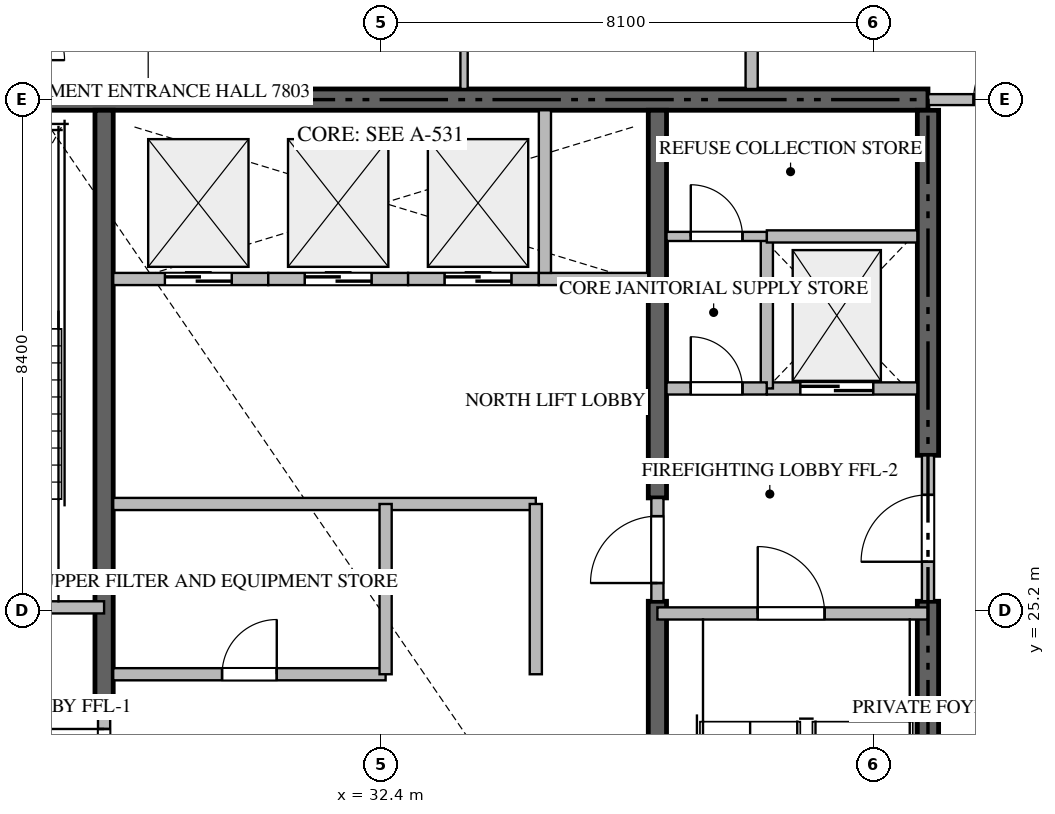
"""IFC4 building model, lengths in metres.
Left out: names, types, materials, properties, quantities, classifications, styles, units other than length and angle.
Written with IfcOpenShell. Run it as: python <this file> out.ifc"""

import sys

from ifc_helpers import new_model, si_unit, direction, frame, frame_2d, origin, place, context, subcontext, project, spatial, rectangle, extrude, source, transform, mapped, element, fill, save


model = new_model("IFC4")
c1 = context("Model", 3, precision=1e-05, world=origin(), true_north=direction((0.0, 1.0)))
c2 = subcontext(c1, "Body", "Model", "MODEL_VIEW")
j1 = project(units=[si_unit("LENGTHUNIT", "METRE"), si_unit("PLANEANGLEUNIT", "RADIAN")], contexts=[c1])
p1 = place(None, origin())
s1 = spatial("IfcSite", under=j1, at=p1, CompositionType="ELEMENT")
p2 = place(p1, origin())
s2 = spatial("IfcBuilding", under=s1, at=p2, CompositionType="ELEMENT")
p3 = place(p2, frame((0.0, 0.0, 313.7)))
s3 = spatial("IfcBuildingStorey", under=s2, at=p3, CompositionType="ELEMENT", Elevation=313.7)
p4 = place(p3, frame((41.4, 33.6, -0.26), z_axis=(0.0, 0.0, 1.0), x_axis=(-1.0, 0.0, 0.0)))
e1 = element("IfcWall", 1, at=p4, inside=s3, PredefinedType="SHEAR", context=c2, shape_type="SweptSolid", body=[
    extrude(rectangle(XDim=18.0, YDim=0.35, at=frame_2d((9.0, 0.0))), origin(), (0.0, 0.0, 1.0), 4.048),
])
p5 = place(p3, frame((41.4, 16.975, -0.26), z_axis=(0.0, 0.0, 1.0), x_axis=(0.0, 1.0, 0.0)))
e2 = element("IfcWall", 2, at=p5, inside=s3, PredefinedType="SHEAR", context=c2, shape_type="SweptSolid", body=[
    extrude(rectangle(XDim=8.375, YDim=0.35, at=frame_2d((4.188, 0.0))), origin(), (0.0, 0.0, 1.0), 4.048),
])
p6 = place(p3, frame((41.4, 27.75, -0.26), z_axis=(0.0, 0.0, 1.0), x_axis=(0.0, 1.0, 0.0)))
e3 = element("IfcWall", 3, at=p6, inside=s3, PredefinedType="SHEAR", context=c2, shape_type="SweptSolid", body=[
    extrude(rectangle(XDim=5.675, YDim=0.35, at=frame_2d((2.837, 0.0))), origin(), (0.0, 0.0, 1.0), 4.048),
])
p7 = place(p3, frame((27.85, 23.55, -0.26), z_axis=(0.0, 0.0, 1.0), x_axis=(0.0, 1.0, 0.0)))
e4 = element("IfcWall", 4, at=p7, inside=s3, PredefinedType="SHEAR", context=c2, shape_type="SweptSolid", body=[
    extrude(rectangle(XDim=9.875, YDim=0.3, at=frame_2d((4.938, 0.0))), origin(), (0.0, 0.0, 1.0), 4.048),
])
p8 = place(p3, frame((36.95, 16.975, -0.26), z_axis=(0.0, 0.0, 1.0), x_axis=(0.0, 1.0, 0.0)))
e5 = element("IfcWall", 5, at=p8, inside=s3, PredefinedType="SHEAR", context=c2, shape_type="SweptSolid", body=[
    extrude(rectangle(XDim=8.375, YDim=0.3, at=frame_2d((4.188, 0.0))), origin(), (0.0, 0.0, 1.0), 4.048),
])
p9 = place(p3, frame((36.95, 27.05, -0.26), z_axis=(0.0, 0.0, 1.0), x_axis=(0.0, 1.0, 0.0)))
e6 = element("IfcWall", 6, at=p9, inside=s3, PredefinedType="SHEAR", context=c2, shape_type="SweptSolid", body=[
    extrude(rectangle(XDim=6.375, YDim=0.3, at=frame_2d((3.188, 0.0))), origin(), (0.0, 0.0, 1.0), 4.048),
])
p10 = place(p3, frame((23.4, 25.25, 0.0), z_axis=(0.0, 0.0, 1.0), x_axis=(1.0, 0.0, 0.0)))
e7 = element("IfcWall", 7, at=p10, inside=s3, PredefinedType="STANDARD", context=c2, shape_type="SweptSolid", body=[
    extrude(rectangle(XDim=4.45, YDim=0.2, at=frame_2d((2.225, 0.0))), origin(), (0.0, 0.0, 1.0), 3.79),
])
p11 = place(p10, frame((1.65, 0.0, 0.0)))
e8 = element("IfcOpeningElement", 8, at=p11, cuts=e7, PredefinedType="OPENING", context=c2, shape_type="SweptSolid", body=[
    extrude(rectangle(XDim=1.1, YDim=2.15, at=frame_2d((0.55, 1.075))), frame((0.0, 0.11, 0.0), z_axis=(0.0, -1.0, 0.0), x_axis=(1.0, 0.0, 0.0)), (0.0, 0.0, 1.0), 0.22),
])
p12 = place(p3, frame((36.95, 25.15, 0.0), z_axis=(0.0, 0.0, 1.0), x_axis=(1.0, 0.0, 0.0)))
e9 = element("IfcWall", 9, at=p12, inside=s3, PredefinedType="STANDARD", context=c2, shape_type="SweptSolid", body=[
    extrude(rectangle(XDim=4.45, YDim=0.2, at=frame_2d((2.225, 0.0))), origin(), (0.0, 0.0, 1.0), 3.79),
])
p13 = place(p12, frame((1.65, 0.0, 0.0)))
e10 = element("IfcOpeningElement", 10, at=p13, cuts=e9, PredefinedType="OPENING", context=c2, shape_type="SweptSolid", body=[
    extrude(rectangle(XDim=1.1, YDim=2.15, at=frame_2d((0.55, 1.075))), frame((0.0, 0.11, 0.0), z_axis=(0.0, -1.0, 0.0), x_axis=(1.0, 0.0, 0.0)), (0.0, 0.0, 1.0), 0.22),
])
p14 = place(p3, frame((38.75, 28.85, 0.0), z_axis=(0.0, 0.0, 1.0), x_axis=(1.0, 0.0, 0.0)))
e11 = element("IfcWall", 11, at=p14, inside=s3, PredefinedType="STANDARD", context=c2, shape_type="SweptSolid", body=[
    extrude(rectangle(XDim=2.475, YDim=0.2, at=frame_2d((1.238, 0.0))), origin(), (0.0, 0.0, 1.0), 3.79),
])
p15 = place(p14, frame((0.55, 0.0, 0.0)))
e12 = element("IfcOpeningElement", 12, at=p15, cuts=e11, PredefinedType="OPENING", context=c2, shape_type="SweptSolid", body=[
    extrude(rectangle(XDim=1.2, YDim=2.2, at=frame_2d((0.6, 1.1))), frame((0.0, 0.11, 0.0), z_axis=(0.0, -1.0, 0.0), x_axis=(1.0, 0.0, 0.0)), (0.0, 0.0, 1.0), 0.22),
])
p16 = place(p3, frame((28.0, 30.65, 0.0), z_axis=(0.0, 0.0, 1.0), x_axis=(1.0, 0.0, 0.0)))
e13 = element("IfcWall", 13, at=p16, inside=s3, PredefinedType="STANDARD", context=c2, shape_type="SweptSolid", body=[
    extrude(rectangle(XDim=2.55, YDim=0.2, at=frame_2d((1.275, 0.0))), origin(), (0.0, 0.0, 1.0), 3.79),
])
p17 = place(p16, frame((0.85, 0.0, 0.0)))
e14 = element("IfcOpeningElement", 14, at=p17, cuts=e13, PredefinedType="OPENING", context=c2, shape_type="SweptSolid", body=[
    extrude(rectangle(XDim=1.1, YDim=2.2, at=frame_2d((0.55, 1.1))), frame((0.0, 0.11, 0.0), z_axis=(0.0, -1.0, 0.0), x_axis=(1.0, 0.0, 0.0)), (0.0, 0.0, 1.0), 0.22),
])
p18 = place(p3, frame((30.55, 30.65, 0.0), z_axis=(0.0, 0.0, 1.0), x_axis=(1.0, 0.0, 0.0)))
e15 = element("IfcWall", 15, at=p18, inside=s3, PredefinedType="STANDARD", context=c2, shape_type="SweptSolid", body=[
    extrude(rectangle(XDim=2.3, YDim=0.2, at=frame_2d((1.15, 0.0))), origin(), (0.0, 0.0, 1.0), 3.79),
])
p19 = place(p18, frame((0.6, 0.0, 0.0)))
e16 = element("IfcOpeningElement", 16, at=p19, cuts=e15, PredefinedType="OPENING", context=c2, shape_type="SweptSolid", body=[
    extrude(rectangle(XDim=1.1, YDim=2.2, at=frame_2d((0.55, 1.1))), frame((0.0, 0.11, 0.0), z_axis=(0.0, -1.0, 0.0), x_axis=(1.0, 0.0, 0.0)), (0.0, 0.0, 1.0), 0.22),
])
p20 = place(p3, frame((32.85, 30.65, 0.0), z_axis=(0.0, 0.0, 1.0), x_axis=(1.0, 0.0, 0.0)))
e17 = element("IfcWall", 17, at=p20, inside=s3, PredefinedType="STANDARD", context=c2, shape_type="SweptSolid", body=[
    extrude(rectangle(XDim=2.15, YDim=0.2, at=frame_2d((1.075, 0.0))), origin(), (0.0, 0.0, 1.0), 3.79),
])
p21 = place(p20, frame((0.6, 0.0, 0.0)))
e18 = element("IfcOpeningElement", 18, at=p21, cuts=e17, PredefinedType="OPENING", context=c2, shape_type="SweptSolid", body=[
    extrude(rectangle(XDim=1.1, YDim=2.2, at=frame_2d((0.55, 1.1))), frame((0.0, 0.11, 0.0), z_axis=(0.0, -1.0, 0.0), x_axis=(1.0, 0.0, 0.0)), (0.0, 0.0, 1.0), 0.22),
])
p22 = place(p3, frame((35.0, 30.65, 0.0), z_axis=(0.0, 0.0, 1.0), x_axis=(1.0, 0.0, 0.0)))
e19 = element("IfcWall", 19, at=p22, inside=s3, PredefinedType="STANDARD", context=c2, shape_type="SweptSolid", body=[
    extrude(rectangle(XDim=1.8, YDim=0.2, at=frame_2d((0.9, 0.0))), origin(), (0.0, 0.0, 1.0), 3.79),
])
p23 = place(p3, frame((35.1, 30.75, 0.0), z_axis=(0.0, 0.0, 1.0), x_axis=(0.0, 1.0, 0.0)))
e20 = element("IfcWall", 20, at=p23, inside=s3, PredefinedType="STANDARD", context=c2, shape_type="SweptSolid", body=[
    extrude(rectangle(XDim=2.675, YDim=0.2, at=frame_2d((1.337, 0.0))), origin(), (0.0, 0.0, 1.0), 3.79),
])
p24 = place(p3, frame((38.75, 28.85, 0.0), z_axis=(0.0, 0.0, 1.0), x_axis=(0.0, 1.0, 0.0)))
e21 = element("IfcWall", 21, at=p24, inside=s3, PredefinedType="STANDARD", context=c2, shape_type="SweptSolid", body=[
    extrude(rectangle(XDim=2.5, YDim=0.2, at=frame_2d((1.25, 0.0))), origin(), (0.0, 0.0, 1.0), 3.79),
])
p25 = place(p3, frame((38.75, 31.35, 0.0), z_axis=(0.0, 0.0, 1.0), x_axis=(1.0, 0.0, 0.0)))
e22 = element("IfcWall", 22, at=p25, inside=s3, PredefinedType="STANDARD", context=c2, shape_type="SweptSolid", body=[
    extrude(rectangle(XDim=2.475, YDim=0.2, at=frame_2d((1.238, 0.0))), origin(), (0.0, 0.0, 1.0), 3.79),
])
p26 = place(p3, frame((37.1, 28.85, 0.0), z_axis=(0.0, 0.0, 1.0), x_axis=(1.0, 0.0, 0.0)))
e23 = element("IfcWall", 23, at=p26, inside=s3, PredefinedType="STANDARD", context=c2, shape_type="SweptSolid", body=[
    extrude(rectangle(XDim=1.648, YDim=0.2, at=frame_2d((0.824, 0.0))), origin(), (0.0, 0.0, 1.0), 3.79),
])
p27 = place(p26, frame((0.399, 0.0, 0.0)))
e24 = element("IfcOpeningElement", 24, at=p27, cuts=e23, PredefinedType="OPENING", context=c2, shape_type="SweptSolid", body=[
    extrude(rectangle(XDim=0.85, YDim=2.1, at=frame_2d((0.425, 1.05))), frame((0.0, 0.11, 0.0), z_axis=(0.0, -1.0, 0.0), x_axis=(1.0, 0.0, 0.0)), (0.0, 0.0, 1.0), 0.22),
])
p28 = place(p3, frame((41.4, 25.352, 0.0), z_axis=(0.0, 0.0, 1.0), x_axis=(0.0, 1.0, 0.0)))
e25 = element("IfcWall", 25, at=p28, inside=s3, PredefinedType="STANDARD", context=c2, shape_type="SweptSolid", body=[
    extrude(rectangle(XDim=2.396, YDim=0.2, at=frame_2d((1.198, 0.0))), origin(), (0.0, 0.0, 1.0), 3.79),
])
p29 = place(p28, frame((0.648, 0.0, 0.0)))
e26 = element("IfcOpeningElement", 26, at=p29, cuts=e25, PredefinedType="OPENING", context=c2, shape_type="SweptSolid", body=[
    extrude(rectangle(XDim=1.1, YDim=2.15, at=frame_2d((0.55, 1.075))), frame((0.0, 0.11, 0.0), z_axis=(0.0, -1.0, 0.0), x_axis=(1.0, 0.0, 0.0)), (0.0, 0.0, 1.0), 0.22),
])
p30 = place(p3, frame((27.85, 21.852, 0.0), z_axis=(0.0, 0.0, 1.0), x_axis=(0.0, 1.0, 0.0)))
e27 = element("IfcWall", 27, at=p30, inside=s3, PredefinedType="STANDARD", context=c2, shape_type="SweptSolid", body=[
    extrude(rectangle(XDim=1.696, YDim=0.2, at=frame_2d((0.848, 0.0))), origin(), (0.0, 0.0, 1.0), 3.79),
])
p31 = place(p30, frame((0.298, 0.0, 0.0)))
e28 = element("IfcOpeningElement", 28, at=p31, cuts=e27, PredefinedType="OPENING", context=c2, shape_type="SweptSolid", body=[
    extrude(rectangle(XDim=1.1, YDim=2.15, at=frame_2d((0.55, 1.075))), frame((0.0, 0.11, 0.0), z_axis=(0.0, -1.0, 0.0), x_axis=(1.0, 0.0, 0.0)), (0.0, 0.0, 1.0), 0.22),
])
p32 = place(p3, frame((36.95, 25.352, 0.0), z_axis=(0.0, 0.0, 1.0), x_axis=(0.0, 1.0, 0.0)))
e29 = element("IfcWall", 29, at=p32, inside=s3, PredefinedType="STANDARD", context=c2, shape_type="SweptSolid", body=[
    extrude(rectangle(XDim=1.696, YDim=0.2, at=frame_2d((0.848, 0.0))), origin(), (0.0, 0.0, 1.0), 3.79),
])
p33 = place(p32, frame((0.298, 0.0, 0.0)))
e30 = element("IfcOpeningElement", 30, at=p33, cuts=e29, PredefinedType="OPENING", context=c2, shape_type="SweptSolid", body=[
    extrude(rectangle(XDim=1.1, YDim=2.15, at=frame_2d((0.55, 1.075))), frame((0.0, 0.11, 0.0), z_axis=(0.0, -1.0, 0.0), x_axis=(1.0, 0.0, 0.0)), (0.0, 0.0, 1.0), 0.22),
])
p34 = place(p3, frame((37.1, 31.35, 0.0), z_axis=(0.0, 0.0, 1.0), x_axis=(1.0, 0.0, 0.0)))
e31 = element("IfcWall", 31, at=p34, inside=s3, PredefinedType="PARTITIONING", context=c2, shape_type="SweptSolid", body=[
    extrude(rectangle(XDim=1.648, YDim=0.15, at=frame_2d((0.824, 0.0))), origin(), (0.0, 0.0, 1.0), 3.79),
])
p35 = place(p34, frame((0.399, 0.0, 0.0)))
e32 = element("IfcOpeningElement", 32, at=p35, cuts=e31, PredefinedType="OPENING", context=c2, shape_type="SweptSolid", body=[
    extrude(rectangle(XDim=0.85, YDim=2.1, at=frame_2d((0.425, 1.05))), frame((0.0, 0.085, 0.0), z_axis=(0.0, -1.0, 0.0), x_axis=(1.0, 0.0, 0.0)), (0.0, 0.0, 1.0), 0.17),
])
p36 = place(p3, frame((28.0, 26.95, 0.0), z_axis=(0.0, 0.0, 1.0), x_axis=(1.0, 0.0, 0.0)))
e33 = element("IfcWall", 33, at=p36, inside=s3, PredefinedType="STANDARD", context=c2, shape_type="SweptSolid", body=[
    extrude(rectangle(XDim=6.95, YDim=0.2, at=frame_2d((3.475, 0.0))), origin(), (0.0, 0.0, 1.0), 3.79),
])
p37 = place(p3, frame((34.95, 24.15, 0.0), z_axis=(0.0, 0.0, 1.0), x_axis=(0.0, 1.0, 0.0)))
e34 = element("IfcWall", 34, at=p37, inside=s3, PredefinedType="STANDARD", context=c2, shape_type="SweptSolid", body=[
    extrude(rectangle(XDim=2.8, YDim=0.2, at=frame_2d((1.4, 0.0))), origin(), (0.0, 0.0, 1.0), 3.79),
])
p38 = place(p3, frame((28.0, 24.15, 0.0), z_axis=(0.0, 0.0, 1.0), x_axis=(1.0, 0.0, 0.0)))
e35 = element("IfcWall", 35, at=p38, inside=s3, PredefinedType="STANDARD", context=c2, shape_type="SweptSolid", body=[
    extrude(rectangle(XDim=4.48, YDim=0.2, at=frame_2d((2.24, 0.0))), origin(), (0.0, 0.0, 1.0), 3.79),
])
p39 = place(p38, frame((1.79, 0.0, 0.0)))
e36 = element("IfcOpeningElement", 36, at=p39, cuts=e35, PredefinedType="OPENING", context=c2, shape_type="SweptSolid", body=[
    extrude(rectangle(XDim=0.9, YDim=2.1, at=frame_2d((0.45, 1.05))), frame((0.0, 0.11, 0.0), z_axis=(0.0, -1.0, 0.0), x_axis=(1.0, 0.0, 0.0)), (0.0, 0.0, 1.0), 0.22),
])
p40 = place(p3, frame((32.48, 24.15, 0.0), z_axis=(0.0, 0.0, 1.0), x_axis=(0.0, 1.0, 0.0)))
e37 = element("IfcWall", 37, at=p40, inside=s3, PredefinedType="STANDARD", context=c2, shape_type="SweptSolid", body=[
    extrude(rectangle(XDim=2.8, YDim=0.2, at=frame_2d((1.4, 0.0))), origin(), (0.0, 0.0, 1.0), 3.79),
])
p41 = place(p3, frame((38.5, 33.775, 0.0), z_axis=(0.0, 0.0, 1.0), x_axis=(0.0, 1.0, 0.0)))
e38 = element("IfcWall", 38, at=p41, inside=s3, PredefinedType="PARTITIONING", context=c2, shape_type="SweptSolid", body=[
    extrude(rectangle(XDim=14.143, YDim=0.2, at=frame_2d((7.072, 0.0))), origin(), (0.0, 0.0, 1.0), 3.79),
])
p42 = place(p3, frame((41.402, 33.6, 0.0), z_axis=(0.0, 0.0, 1.0), x_axis=(1.0, 0.0, 0.0)))
e39 = element("IfcWall", 39, at=p42, inside=s3, PredefinedType="PARTITIONING", context=c2, shape_type="SweptSolid", body=[
    extrude(rectangle(XDim=2.496, YDim=0.18, at=frame_2d((1.248, 0.0))), origin(), (0.0, 0.0, 1.0), 3.79),
])
p43 = place(p42, frame((0.748, 0.0, 0.0)))
e40 = element("IfcOpeningElement", 40, at=p43, cuts=e39, PredefinedType="OPENING", context=c2, shape_type="SweptSolid", body=[
    extrude(rectangle(XDim=1.0, YDim=2.15, at=frame_2d((0.5, 1.075))), frame((0.0, 0.1, 0.0), z_axis=(0.0, -1.0, 0.0), x_axis=(1.0, 0.0, 0.0)), (0.0, 0.0, 1.0), 0.2),
])
p44 = place(p3, frame((33.77, 35.748, 0.0), z_axis=(0.0, 0.0, 1.0), x_axis=(0.0, -1.0, 0.0)))
e41 = element("IfcWall", 41, at=p44, inside=s3, PredefinedType="PARTITIONING", context=c2, shape_type="SweptSolid", body=[
    extrude(rectangle(XDim=1.973, YDim=0.12, at=frame_2d((0.987, 0.0))), origin(), (0.0, 0.0, 1.0), 3.79),
])
m1 = source(origin(), c2, "Body", "SweptSolid", [
    extrude(rectangle(XDim=1.1, YDim=2.15, at=frame_2d((0.55, 1.075))), frame((0.0, 0.025, 0.0), z_axis=(0.0, -1.0, 0.0), x_axis=(1.0, 0.0, 0.0)), (0.0, 0.0, 1.0), 0.05),
])
p45 = place(p13, origin())
e42 = element("IfcDoor", 42, at=p45, inside=s3, OperationType="SINGLE_SWING_LEFT", PredefinedType="DOOR", context=c2, shape_type="MappedRepresentation", body=[
    mapped(m1, transform((0.0, 0.0, 0.0), scale=1.0)),
])
fill(e10, e42)
m2 = source(origin(), c2, "Body", "SweptSolid", [
    extrude(rectangle(XDim=1.2, YDim=2.2, at=frame_2d((0.6, 1.1))), frame((0.0, 0.025, 0.0), z_axis=(0.0, -1.0, 0.0), x_axis=(1.0, 0.0, 0.0)), (0.0, 0.0, 1.0), 0.05),
])
p46 = place(p15, origin())
e43 = element("IfcDoor", 43, at=p46, inside=s3, OperationType="DOUBLE_DOOR_SLIDING", PredefinedType="DOOR", context=c2, shape_type="MappedRepresentation", body=[
    mapped(m2, transform((0.0, 0.0, 0.0), scale=1.0)),
])
fill(e12, e43)
m3 = source(origin(), c2, "Body", "SweptSolid", [
    extrude(rectangle(XDim=1.1, YDim=2.2, at=frame_2d((0.55, 1.1))), frame((0.0, 0.025, 0.0), z_axis=(0.0, -1.0, 0.0), x_axis=(1.0, 0.0, 0.0)), (0.0, 0.0, 1.0), 0.05),
])
p47 = place(p17, origin())
e44 = element("IfcDoor", 44, at=p47, inside=s3, OperationType="DOUBLE_DOOR_SLIDING", PredefinedType="DOOR", context=c2, shape_type="MappedRepresentation", body=[
    mapped(m3, transform((0.0, 0.0, 0.0), scale=1.0)),
])
fill(e14, e44)
p48 = place(p19, origin())
e45 = element("IfcDoor", 45, at=p48, inside=s3, OperationType="DOUBLE_DOOR_SLIDING", PredefinedType="DOOR", context=c2, shape_type="MappedRepresentation", body=[
    mapped(m3, transform((0.0, 0.0, 0.0), scale=1.0)),
])
fill(e16, e45)
p49 = place(p21, origin())
e46 = element("IfcDoor", 46, at=p49, inside=s3, OperationType="DOUBLE_DOOR_SLIDING", PredefinedType="DOOR", context=c2, shape_type="MappedRepresentation", body=[
    mapped(m3, transform((0.0, 0.0, 0.0), scale=1.0)),
])
fill(e18, e46)
m4 = source(origin(), c2, "Body", "SweptSolid", [
    extrude(rectangle(XDim=0.85, YDim=2.1, at=frame_2d((0.425, 1.05))), frame((0.0, 0.025, 0.0), z_axis=(0.0, -1.0, 0.0), x_axis=(1.0, 0.0, 0.0)), (0.0, 0.0, 1.0), 0.05),
])
p50 = place(p27, origin())
e47 = element("IfcDoor", 47, at=p50, inside=s3, OperationType="SINGLE_SWING_LEFT", PredefinedType="DOOR", context=c2, shape_type="MappedRepresentation", body=[
    mapped(m4, transform((0.0, 0.0, 0.0), scale=1.0)),
])
fill(e24, e47)
p51 = place(p29, origin())
e48 = element("IfcDoor", 48, at=p51, inside=s3, OperationType="SINGLE_SWING_LEFT", PredefinedType="DOOR", context=c2, shape_type="MappedRepresentation", body=[
    mapped(m1, transform((0.0, 0.0, 0.0), scale=1.0)),
])
fill(e26, e48)
p52 = place(p31, origin())
e49 = element("IfcDoor", 49, at=p52, inside=s3, OperationType="SINGLE_SWING_RIGHT", PredefinedType="DOOR", context=c2, shape_type="MappedRepresentation", body=[
    mapped(m1, transform((0.0, 0.0, 0.0), scale=1.0)),
])
fill(e28, e49)
p53 = place(p33, origin())
e50 = element("IfcDoor", 50, at=p53, inside=s3, OperationType="SINGLE_SWING_LEFT", PredefinedType="DOOR", context=c2, shape_type="MappedRepresentation", body=[
    mapped(m1, transform((0.0, 0.0, 0.0), scale=1.0)),
])
fill(e30, e50)
p54 = place(p35, origin())
e51 = element("IfcDoor", 51, at=p54, inside=s3, OperationType="SINGLE_SWING_LEFT", PredefinedType="DOOR", context=c2, shape_type="MappedRepresentation", body=[
    mapped(m4, transform((0.0, 0.0, 0.0), scale=1.0)),
])
fill(e32, e51)
m5 = source(origin(), c2, "Body", "SweptSolid", [
    extrude(rectangle(XDim=0.9, YDim=2.1, at=frame_2d((0.45, 1.05))), frame((0.0, 0.025, 0.0), z_axis=(0.0, -1.0, 0.0), x_axis=(1.0, 0.0, 0.0)), (0.0, 0.0, 1.0), 0.05),
])
p55 = place(p39, origin())
e52 = element("IfcDoor", 52, at=p55, inside=s3, OperationType="SINGLE_SWING_RIGHT", PredefinedType="DOOR", context=c2, shape_type="MappedRepresentation", body=[
    mapped(m5, transform((0.0, 0.0, 0.0), scale=1.0)),
])
fill(e36, e52)
m6 = source(origin(), c2, "Body", "SweptSolid", [
    extrude(rectangle(XDim=1.0, YDim=2.15, at=frame_2d((0.5, 1.075))), frame((0.0, 0.025, 0.0), z_axis=(0.0, -1.0, 0.0), x_axis=(1.0, 0.0, 0.0)), (0.0, 0.0, 1.0), 0.05),
])
p56 = place(p43, origin())
e53 = element("IfcDoor", 53, at=p56, inside=s3, OperationType="SINGLE_SWING_RIGHT", PredefinedType="DOOR", context=c2, shape_type="MappedRepresentation", body=[
    mapped(m6, transform((0.0, 0.0, 0.0), scale=1.0)),
])
fill(e40, e53)
save(model, sys.argv[1])
